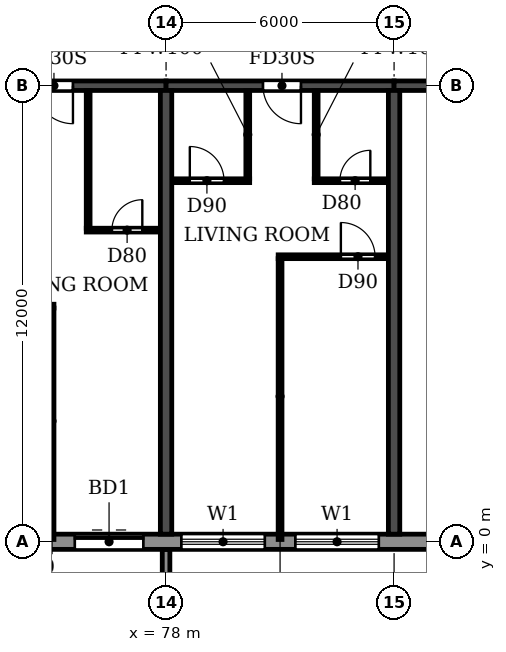
"""IFC4 building model, lengths in metres.
Left out: names, types, materials, properties, quantities, classifications, styles, units other than length and angle.
Written with IfcOpenShell. Run it as: python <this file> out.ifc"""

import sys

from ifc_helpers import new_model, si_unit, direction, frame, frame_2d, origin, place, context, subcontext, project, spatial, polyline, rectangle, outline, extrude, source, transform, mapped, element, fill, save


model = new_model("IFC4")
c1 = context("Model", 3, precision=1e-05, world=origin(), true_north=direction((0.0, 1.0)))
c2 = subcontext(c1, "Body", "Model", "MODEL_VIEW")
j1 = project(units=[si_unit("LENGTHUNIT", "METRE"), si_unit("PLANEANGLEUNIT", "RADIAN")], contexts=[c1])
p1 = place(None, origin())
s1 = spatial("IfcSite", under=j1, at=p1, CompositionType="ELEMENT")
p2 = place(p1, origin())
s2 = spatial("IfcBuilding", under=s1, at=p2, CompositionType="ELEMENT")
p3 = place(p2, frame((0.0, 0.0, 122.4)))
s3 = spatial("IfcBuildingStorey", under=s2, at=p3, CompositionType="ELEMENT", Elevation=122.4)
for number, where, z_axis, x_axis in (
    (1, (78.0, 0.2, 0.0), (0.0, 0.0, 1.0), (0.0, 1.0, 0.0)),
    (2, (84.0, 0.2, 0.0), (0.0, 0.0, 1.0), (0.0, 1.0, 0.0)),
):
    element("IfcWall", number, at=place(p3, frame(where, z_axis=z_axis, x_axis=x_axis)), inside=s3, PredefinedType="SHEAR", context=c2, shape_type="SweptSolid", body=[
        extrude(rectangle(XDim=11.675, YDim=0.3, at=frame_2d((5.837, 0.0))), origin(), (0.0, 0.0, 1.0), 3.07),
    ])
p4 = place(p3, frame((72.0, 12.0, 0.0), z_axis=(0.0, 0.0, 1.0), x_axis=(1.0, 0.0, 0.0)))
e3 = element("IfcWall", 3, at=p4, inside=s3, PredefinedType="SHEAR", context=c2, shape_type="SweptSolid", body=[
    extrude(rectangle(XDim=6.0, YDim=0.25, at=frame_2d((3.0, 0.0))), origin(), (0.0, 0.0, 1.0), 2.47),
])
p5 = place(p4, frame((2.55, 0.0, 0.0)))
e4 = element("IfcOpeningElement", 4, at=p5, cuts=e3, PredefinedType="OPENING", context=c2, shape_type="SweptSolid", body=[
    extrude(rectangle(XDim=1.0, YDim=2.1, at=frame_2d((0.5, 1.05))), frame((0.0, 0.135, 0.0), z_axis=(0.0, -1.0, 0.0), x_axis=(1.0, 0.0, 0.0)), (0.0, 0.0, 1.0), 0.27),
])
p6 = place(p3, frame((78.0, 12.0, 0.0), z_axis=(0.0, 0.0, 1.0), x_axis=(1.0, 0.0, 0.0)))
e5 = element("IfcWall", 5, at=p6, inside=s3, PredefinedType="SHEAR", context=c2, shape_type="SweptSolid", body=[
    extrude(rectangle(XDim=6.0, YDim=0.25, at=frame_2d((3.0, 0.0))), origin(), (0.0, 0.0, 1.0), 2.47),
])
p7 = place(p6, frame((2.55, 0.0, 0.0)))
e6 = element("IfcOpeningElement", 6, at=p7, cuts=e5, PredefinedType="OPENING", context=c2, shape_type="SweptSolid", body=[
    extrude(rectangle(XDim=1.0, YDim=2.1, at=frame_2d((0.5, 1.05))), frame((0.0, 0.135, 0.0), z_axis=(0.0, -1.0, 0.0), x_axis=(1.0, 0.0, 0.0)), (0.0, 0.0, 1.0), 0.27),
])
p8 = place(p3, frame((84.0, 12.0, 0.0), z_axis=(0.0, 0.0, 1.0), x_axis=(1.0, 0.0, 0.0)))
e7 = element("IfcWall", 7, at=p8, inside=s3, PredefinedType="SHEAR", context=c2, shape_type="SweptSolid", body=[
    extrude(rectangle(XDim=5.8, YDim=0.25, at=frame_2d((2.9, 0.0))), origin(), (0.0, 0.0, 1.0), 2.47),
])
p9 = place(p8, frame((2.5, 0.0, 0.0)))
e8 = element("IfcOpeningElement", 8, at=p9, cuts=e7, PredefinedType="OPENING", context=c2, shape_type="SweptSolid", body=[
    extrude(rectangle(XDim=1.0, YDim=2.1, at=frame_2d((0.5, 1.05))), frame((0.0, 0.135, 0.0), z_axis=(0.0, -1.0, 0.0), x_axis=(1.0, 0.0, 0.0)), (0.0, 0.0, 1.0), 0.27),
])
p10 = place(p3, frame((16.683, 0.0, 0.0), z_axis=(0.0, 0.0, 1.0), x_axis=(1.0, 0.0, 0.0)))
e9 = element("IfcWall", 9, at=p10, inside=s3, PredefinedType="STANDARD", context=c2, shape_type="SweptSolid", body=[
    extrude(rectangle(XDim=68.634, YDim=0.4, at=frame_2d((34.317, 0.0))), origin(), (0.0, 0.0, 1.0), 3.07),
])
p11 = place(p10, frame((1.717, 0.0, 0.9)))
e10 = element("IfcOpeningElement", 10, at=p11, cuts=e9, PredefinedType="OPENING", context=c2, shape_type="SweptSolid", body=[
    extrude(rectangle(XDim=2.2, YDim=1.5, at=frame_2d((1.1, 0.75))), frame((0.0, 0.21, 0.0), z_axis=(0.0, -1.0, 0.0), x_axis=(1.0, 0.0, 0.0)), (0.0, 0.0, 1.0), 0.42),
])
p12 = place(p10, frame((4.717, 0.0, 0.9)))
e11 = element("IfcOpeningElement", 11, at=p12, cuts=e9, PredefinedType="OPENING", context=c2, shape_type="SweptSolid", body=[
    extrude(rectangle(XDim=2.2, YDim=1.5, at=frame_2d((1.1, 0.75))), frame((0.0, 0.21, 0.0), z_axis=(0.0, -1.0, 0.0), x_axis=(1.0, 0.0, 0.0)), (0.0, 0.0, 1.0), 0.42),
])
p13 = place(p10, frame((7.717, 0.0, 0.9)))
e12 = element("IfcOpeningElement", 12, at=p13, cuts=e9, PredefinedType="OPENING", context=c2, shape_type="SweptSolid", body=[
    extrude(rectangle(XDim=2.2, YDim=1.5, at=frame_2d((1.1, 0.75))), frame((0.0, 0.21, 0.0), z_axis=(0.0, -1.0, 0.0), x_axis=(1.0, 0.0, 0.0)), (0.0, 0.0, 1.0), 0.42),
])
p14 = place(p10, frame((10.717, 0.0, 0.9)))
e13 = element("IfcOpeningElement", 13, at=p14, cuts=e9, PredefinedType="OPENING", context=c2, shape_type="SweptSolid", body=[
    extrude(rectangle(XDim=2.2, YDim=1.5, at=frame_2d((1.1, 0.75))), frame((0.0, 0.21, 0.0), z_axis=(0.0, -1.0, 0.0), x_axis=(1.0, 0.0, 0.0)), (0.0, 0.0, 1.0), 0.42),
])
p15 = place(p10, frame((13.717, 0.0, 0.9)))
e14 = element("IfcOpeningElement", 14, at=p15, cuts=e9, PredefinedType="OPENING", context=c2, shape_type="SweptSolid", body=[
    extrude(rectangle(XDim=2.2, YDim=1.5, at=frame_2d((1.1, 0.75))), frame((0.0, 0.21, 0.0), z_axis=(0.0, -1.0, 0.0), x_axis=(1.0, 0.0, 0.0)), (0.0, 0.0, 1.0), 0.42),
])
p16 = place(p10, frame((16.717, 0.0, 0.9)))
e15 = element("IfcOpeningElement", 15, at=p16, cuts=e9, PredefinedType="OPENING", context=c2, shape_type="SweptSolid", body=[
    extrude(rectangle(XDim=2.2, YDim=1.5, at=frame_2d((1.1, 0.75))), frame((0.0, 0.21, 0.0), z_axis=(0.0, -1.0, 0.0), x_axis=(1.0, 0.0, 0.0)), (0.0, 0.0, 1.0), 0.42),
])
p17 = place(p10, frame((19.717, 0.0, 0.9)))
e16 = element("IfcOpeningElement", 16, at=p17, cuts=e9, PredefinedType="OPENING", context=c2, shape_type="SweptSolid", body=[
    extrude(rectangle(XDim=2.2, YDim=1.5, at=frame_2d((1.1, 0.75))), frame((0.0, 0.21, 0.0), z_axis=(0.0, -1.0, 0.0), x_axis=(1.0, 0.0, 0.0)), (0.0, 0.0, 1.0), 0.42),
])
p18 = place(p10, frame((22.917, 0.0, 0.0)))
e17 = element("IfcOpeningElement", 17, at=p18, cuts=e9, PredefinedType="OPENING", context=c2, shape_type="SweptSolid", body=[
    extrude(rectangle(XDim=1.8, YDim=2.4, at=frame_2d((0.9, 1.2))), frame((0.0, 0.21, 0.0), z_axis=(0.0, -1.0, 0.0), x_axis=(1.0, 0.0, 0.0)), (0.0, 0.0, 1.0), 0.42),
])
p19 = place(p10, frame((25.717, 0.0, 0.9)))
e18 = element("IfcOpeningElement", 18, at=p19, cuts=e9, PredefinedType="OPENING", context=c2, shape_type="SweptSolid", body=[
    extrude(rectangle(XDim=2.2, YDim=1.5, at=frame_2d((1.1, 0.75))), frame((0.0, 0.21, 0.0), z_axis=(0.0, -1.0, 0.0), x_axis=(1.0, 0.0, 0.0)), (0.0, 0.0, 1.0), 0.42),
])
p20 = place(p10, frame((28.717, 0.0, 0.9)))
e19 = element("IfcOpeningElement", 19, at=p20, cuts=e9, PredefinedType="OPENING", context=c2, shape_type="SweptSolid", body=[
    extrude(rectangle(XDim=2.2, YDim=1.5, at=frame_2d((1.1, 0.75))), frame((0.0, 0.21, 0.0), z_axis=(0.0, -1.0, 0.0), x_axis=(1.0, 0.0, 0.0)), (0.0, 0.0, 1.0), 0.42),
])
p21 = place(p10, frame((31.717, 0.0, 0.9)))
e20 = element("IfcOpeningElement", 20, at=p21, cuts=e9, PredefinedType="OPENING", context=c2, shape_type="SweptSolid", body=[
    extrude(rectangle(XDim=2.2, YDim=1.5, at=frame_2d((1.1, 0.75))), frame((0.0, 0.21, 0.0), z_axis=(0.0, -1.0, 0.0), x_axis=(1.0, 0.0, 0.0)), (0.0, 0.0, 1.0), 0.42),
])
p22 = place(p10, frame((34.917, 0.0, 0.0)))
e21 = element("IfcOpeningElement", 21, at=p22, cuts=e9, PredefinedType="OPENING", context=c2, shape_type="SweptSolid", body=[
    extrude(rectangle(XDim=1.8, YDim=2.4, at=frame_2d((0.9, 1.2))), frame((0.0, 0.21, 0.0), z_axis=(0.0, -1.0, 0.0), x_axis=(1.0, 0.0, 0.0)), (0.0, 0.0, 1.0), 0.42),
])
p23 = place(p10, frame((37.717, 0.0, 0.9)))
e22 = element("IfcOpeningElement", 22, at=p23, cuts=e9, PredefinedType="OPENING", context=c2, shape_type="SweptSolid", body=[
    extrude(rectangle(XDim=2.2, YDim=1.5, at=frame_2d((1.1, 0.75))), frame((0.0, 0.21, 0.0), z_axis=(0.0, -1.0, 0.0), x_axis=(1.0, 0.0, 0.0)), (0.0, 0.0, 1.0), 0.42),
])
p24 = place(p10, frame((40.717, 0.0, 0.9)))
e23 = element("IfcOpeningElement", 23, at=p24, cuts=e9, PredefinedType="OPENING", context=c2, shape_type="SweptSolid", body=[
    extrude(rectangle(XDim=2.2, YDim=1.5, at=frame_2d((1.1, 0.75))), frame((0.0, 0.21, 0.0), z_axis=(0.0, -1.0, 0.0), x_axis=(1.0, 0.0, 0.0)), (0.0, 0.0, 1.0), 0.42),
])
p25 = place(p10, frame((43.717, 0.0, 0.9)))
e24 = element("IfcOpeningElement", 24, at=p25, cuts=e9, PredefinedType="OPENING", context=c2, shape_type="SweptSolid", body=[
    extrude(rectangle(XDim=2.2, YDim=1.5, at=frame_2d((1.1, 0.75))), frame((0.0, 0.21, 0.0), z_axis=(0.0, -1.0, 0.0), x_axis=(1.0, 0.0, 0.0)), (0.0, 0.0, 1.0), 0.42),
])
p26 = place(p10, frame((46.917, 0.0, 0.0)))
e25 = element("IfcOpeningElement", 25, at=p26, cuts=e9, PredefinedType="OPENING", context=c2, shape_type="SweptSolid", body=[
    extrude(rectangle(XDim=1.8, YDim=2.4, at=frame_2d((0.9, 1.2))), frame((0.0, 0.21, 0.0), z_axis=(0.0, -1.0, 0.0), x_axis=(1.0, 0.0, 0.0)), (0.0, 0.0, 1.0), 0.42),
])
p27 = place(p10, frame((49.717, 0.0, 0.9)))
e26 = element("IfcOpeningElement", 26, at=p27, cuts=e9, PredefinedType="OPENING", context=c2, shape_type="SweptSolid", body=[
    extrude(rectangle(XDim=2.2, YDim=1.5, at=frame_2d((1.1, 0.75))), frame((0.0, 0.21, 0.0), z_axis=(0.0, -1.0, 0.0), x_axis=(1.0, 0.0, 0.0)), (0.0, 0.0, 1.0), 0.42),
])
p28 = place(p10, frame((52.717, 0.0, 0.9)))
e27 = element("IfcOpeningElement", 27, at=p28, cuts=e9, PredefinedType="OPENING", context=c2, shape_type="SweptSolid", body=[
    extrude(rectangle(XDim=2.2, YDim=1.5, at=frame_2d((1.1, 0.75))), frame((0.0, 0.21, 0.0), z_axis=(0.0, -1.0, 0.0), x_axis=(1.0, 0.0, 0.0)), (0.0, 0.0, 1.0), 0.42),
])
p29 = place(p10, frame((55.717, 0.0, 0.9)))
e28 = element("IfcOpeningElement", 28, at=p29, cuts=e9, PredefinedType="OPENING", context=c2, shape_type="SweptSolid", body=[
    extrude(rectangle(XDim=2.2, YDim=1.5, at=frame_2d((1.1, 0.75))), frame((0.0, 0.21, 0.0), z_axis=(0.0, -1.0, 0.0), x_axis=(1.0, 0.0, 0.0)), (0.0, 0.0, 1.0), 0.42),
])
p30 = place(p10, frame((58.917, 0.0, 0.0)))
e29 = element("IfcOpeningElement", 29, at=p30, cuts=e9, PredefinedType="OPENING", context=c2, shape_type="SweptSolid", body=[
    extrude(rectangle(XDim=1.8, YDim=2.4, at=frame_2d((0.9, 1.2))), frame((0.0, 0.21, 0.0), z_axis=(0.0, -1.0, 0.0), x_axis=(1.0, 0.0, 0.0)), (0.0, 0.0, 1.0), 0.42),
])
p31 = place(p10, frame((61.717, 0.0, 0.9)))
e30 = element("IfcOpeningElement", 30, at=p31, cuts=e9, PredefinedType="OPENING", context=c2, shape_type="SweptSolid", body=[
    extrude(rectangle(XDim=2.2, YDim=1.5, at=frame_2d((1.1, 0.75))), frame((0.0, 0.21, 0.0), z_axis=(0.0, -1.0, 0.0), x_axis=(1.0, 0.0, 0.0)), (0.0, 0.0, 1.0), 0.42),
])
p32 = place(p10, frame((64.717, 0.0, 0.9)))
e31 = element("IfcOpeningElement", 31, at=p32, cuts=e9, PredefinedType="OPENING", context=c2, shape_type="SweptSolid", body=[
    extrude(rectangle(XDim=2.2, YDim=1.5, at=frame_2d((1.1, 0.75))), frame((0.0, 0.21, 0.0), z_axis=(0.0, -1.0, 0.0), x_axis=(1.0, 0.0, 0.0)), (0.0, 0.0, 1.0), 0.42),
])
m1 = source(origin(), c2, "Body", "SweptSolid", [
    extrude(outline(polyline([(0.0, 0.0), (0.2, 0.0), (0.2, 1.65), (0.0, 1.65), (0.0, 0.0)])), origin(), (0.0, 0.0, 1.0), 3.1),
])
p33 = place(p3, frame((77.9, -1.85, 0.0)))
e32 = element("IfcWall", 32, at=p33, inside=s3, PredefinedType="STANDARD", context=c2, shape_type="MappedRepresentation", body=[
    mapped(m1, transform((0.0, 0.0, 0.0))),
])
p34 = place(p3, frame((72.16, 6.2, 0.0), z_axis=(0.0, 0.0, 1.0), x_axis=(1.0, 0.0, 0.0)))
e33 = element("IfcWall", 33, at=p34, inside=s3, PredefinedType="PARTITIONING", context=c2, shape_type="SweptSolid", body=[
    extrude(rectangle(XDim=2.89, YDim=0.1, at=frame_2d((1.445, 0.0))), origin(), (0.0, 0.0, 1.0), 3.07),
])
p35 = place(p34, frame((0.34, 0.0, 0.0)))
e34 = element("IfcOpeningElement", 34, at=p35, cuts=e33, PredefinedType="OPENING", context=c2, shape_type="SweptSolid", body=[
    extrude(rectangle(XDim=0.9, YDim=2.1, at=frame_2d((0.45, 1.05))), frame((0.0, 0.06, 0.0), z_axis=(0.0, -1.0, 0.0), x_axis=(1.0, 0.0, 0.0)), (0.0, 0.0, 1.0), 0.12),
])
p36 = place(p3, frame((80.95, 7.5, 0.0), z_axis=(0.0, 0.0, 1.0), x_axis=(1.0, 0.0, 0.0)))
e35 = element("IfcWall", 35, at=p36, inside=s3, PredefinedType="PARTITIONING", context=c2, shape_type="SweptSolid", body=[
    extrude(rectangle(XDim=2.89, YDim=0.1, at=frame_2d((1.445, 0.0))), origin(), (0.0, 0.0, 1.0), 3.07),
])
p37 = place(p36, frame((1.65, 0.0, 0.0)))
e36 = element("IfcOpeningElement", 36, at=p37, cuts=e35, PredefinedType="OPENING", context=c2, shape_type="SweptSolid", body=[
    extrude(rectangle(XDim=0.9, YDim=2.1, at=frame_2d((0.45, 1.05))), frame((0.0, 0.06, 0.0), z_axis=(0.0, -1.0, 0.0), x_axis=(1.0, 0.0, 0.0)), (0.0, 0.0, 1.0), 0.12),
])
p38 = place(p3, frame((75.9, 8.2, 0.0), z_axis=(0.0, 0.0, 1.0), x_axis=(1.0, 0.0, 0.0)))
e37 = element("IfcWall", 37, at=p38, inside=s3, PredefinedType="PARTITIONING", context=c2, shape_type="SweptSolid", body=[
    extrude(rectangle(XDim=1.94, YDim=0.1, at=frame_2d((0.97, 0.0))), origin(), (0.0, 0.0, 1.0), 3.07),
])
p39 = place(p38, frame((0.675, 0.0, 0.0)))
e38 = element("IfcOpeningElement", 38, at=p39, cuts=e37, PredefinedType="OPENING", context=c2, shape_type="SweptSolid", body=[
    extrude(rectangle(XDim=0.8, YDim=2.1, at=frame_2d((0.4, 1.05))), frame((0.0, 0.06, 0.0), z_axis=(0.0, -1.0, 0.0), x_axis=(1.0, 0.0, 0.0)), (0.0, 0.0, 1.0), 0.12),
])
p40 = place(p3, frame((78.16, 9.5, 0.0), z_axis=(0.0, 0.0, 1.0), x_axis=(1.0, 0.0, 0.0)))
e39 = element("IfcWall", 39, at=p40, inside=s3, PredefinedType="PARTITIONING", context=c2, shape_type="SweptSolid", body=[
    extrude(rectangle(XDim=2.04, YDim=0.1, at=frame_2d((1.02, 0.0))), origin(), (0.0, 0.0, 1.0), 3.07),
])
p41 = place(p40, frame((0.465, 0.0, 0.0)))
e40 = element("IfcOpeningElement", 40, at=p41, cuts=e39, PredefinedType="OPENING", context=c2, shape_type="SweptSolid", body=[
    extrude(rectangle(XDim=0.9, YDim=2.1, at=frame_2d((0.45, 1.05))), frame((0.0, 0.06, 0.0), z_axis=(0.0, -1.0, 0.0), x_axis=(1.0, 0.0, 0.0)), (0.0, 0.0, 1.0), 0.12),
])
p42 = place(p3, frame((81.9, 9.5, 0.0), z_axis=(0.0, 0.0, 1.0), x_axis=(1.0, 0.0, 0.0)))
e41 = element("IfcWall", 41, at=p42, inside=s3, PredefinedType="PARTITIONING", context=c2, shape_type="SweptSolid", body=[
    extrude(rectangle(XDim=1.94, YDim=0.1, at=frame_2d((0.97, 0.0))), origin(), (0.0, 0.0, 1.0), 3.07),
])
p43 = place(p42, frame((0.675, 0.0, 0.0)))
e42 = element("IfcOpeningElement", 42, at=p43, cuts=e41, PredefinedType="OPENING", context=c2, shape_type="SweptSolid", body=[
    extrude(rectangle(XDim=0.8, YDim=2.1, at=frame_2d((0.4, 1.05))), frame((0.0, 0.06, 0.0), z_axis=(0.0, -1.0, 0.0), x_axis=(1.0, 0.0, 0.0)), (0.0, 0.0, 1.0), 0.12),
])
p44 = place(p3, frame((75.0, 0.06, 0.0), z_axis=(0.0, 0.0, 1.0), x_axis=(0.0, 1.0, 0.0)))
e43 = element("IfcWall", 43, at=p44, inside=s3, PredefinedType="PARTITIONING", context=c2, shape_type="SweptSolid", body=[
    extrude(rectangle(XDim=6.09, YDim=0.1, at=frame_2d((3.045, 0.0))), origin(), (0.0, 0.0, 1.0), 3.07),
])
p45 = place(p3, frame((75.95, 8.25, 0.0), z_axis=(0.0, 0.0, 1.0), x_axis=(0.0, 1.0, 0.0)))
e44 = element("IfcWall", 44, at=p45, inside=s3, PredefinedType="PARTITIONING", context=c2, shape_type="SweptSolid", body=[
    extrude(rectangle(XDim=3.615, YDim=0.1, at=frame_2d((1.808, 0.0))), origin(), (0.0, 0.0, 1.0), 3.07),
])
p46 = place(p3, frame((80.15, 9.55, 0.0), z_axis=(0.0, 0.0, 1.0), x_axis=(0.0, 1.0, 0.0)))
e45 = element("IfcWall", 45, at=p46, inside=s3, PredefinedType="PARTITIONING", context=c2, shape_type="SweptSolid", body=[
    extrude(rectangle(XDim=2.315, YDim=0.1, at=frame_2d((1.157, 0.0))), origin(), (0.0, 0.0, 1.0), 3.07),
])
p47 = place(p3, frame((81.0, 0.06, 0.0), z_axis=(0.0, 0.0, 1.0), x_axis=(0.0, 1.0, 0.0)))
e46 = element("IfcWall", 46, at=p47, inside=s3, PredefinedType="PARTITIONING", context=c2, shape_type="SweptSolid", body=[
    extrude(rectangle(XDim=7.39, YDim=0.1, at=frame_2d((3.695, 0.0))), origin(), (0.0, 0.0, 1.0), 3.07),
])
p48 = place(p3, frame((81.95, 9.55, 0.0), z_axis=(0.0, 0.0, 1.0), x_axis=(0.0, 1.0, 0.0)))
e47 = element("IfcWall", 47, at=p48, inside=s3, PredefinedType="PARTITIONING", context=c2, shape_type="SweptSolid", body=[
    extrude(rectangle(XDim=2.315, YDim=0.1, at=frame_2d((1.157, 0.0))), origin(), (0.0, 0.0, 1.0), 3.07),
])
p49 = place(p30, origin())
e48 = element("IfcDoor", 48, at=p49, inside=s3, OperationType="DOUBLE_DOOR_SLIDING", PredefinedType="DOOR", context=c2, shape_type="SweptSolid", body=[
    extrude(rectangle(XDim=1.8, YDim=2.4, at=frame_2d((0.9, 1.2))), frame((0.0, 0.025, 0.0), z_axis=(0.0, -1.0, 0.0), x_axis=(1.0, 0.0, 0.0)), (0.0, 0.0, 1.0), 0.05),
])
fill(e29, e48)
p50 = place(p31, origin())
e49 = element("IfcWindow", 49, at=p50, inside=s3, PartitioningType="DOUBLE_PANEL_HORIZONTAL", PredefinedType="WINDOW", context=c2, shape_type="SweptSolid", body=[
    extrude(rectangle(XDim=2.2, YDim=1.5, at=frame_2d((1.1, 0.75))), frame((0.0, 0.03, 0.0), z_axis=(0.0, -1.0, 0.0), x_axis=(1.0, 0.0, 0.0)), (0.0, 0.0, 1.0), 0.06),
])
fill(e30, e49)
p51 = place(p32, origin())
e50 = element("IfcWindow", 50, at=p51, inside=s3, PartitioningType="DOUBLE_PANEL_HORIZONTAL", PredefinedType="WINDOW", context=c2, shape_type="SweptSolid", body=[
    extrude(rectangle(XDim=2.2, YDim=1.5, at=frame_2d((1.1, 0.75))), frame((0.0, 0.03, 0.0), z_axis=(0.0, -1.0, 0.0), x_axis=(1.0, 0.0, 0.0)), (0.0, 0.0, 1.0), 0.06),
])
fill(e31, e50)
p52 = place(p5, frame((1.0, 0.0, 0.0), z_axis=(0.0, 0.0, 1.0), x_axis=(-1.0, 0.0, 0.0)))
e51 = element("IfcDoor", 51, at=p52, inside=s3, OperationType="SINGLE_SWING_LEFT", PredefinedType="DOOR", context=c2, shape_type="SweptSolid", body=[
    extrude(rectangle(XDim=1.0, YDim=2.1, at=frame_2d((0.5, 1.05))), frame((0.0, 0.025, 0.0), z_axis=(0.0, -1.0, 0.0), x_axis=(1.0, 0.0, 0.0)), (0.0, 0.0, 1.0), 0.05),
])
fill(e4, e51)
p53 = place(p39, origin())
e52 = element("IfcDoor", 52, at=p53, inside=s3, OperationType="SINGLE_SWING_RIGHT", PredefinedType="DOOR", context=c2, shape_type="SweptSolid", body=[
    extrude(rectangle(XDim=0.8, YDim=2.1, at=frame_2d((0.4, 1.05))), frame((0.0, 0.025, 0.0), z_axis=(0.0, -1.0, 0.0), x_axis=(1.0, 0.0, 0.0)), (0.0, 0.0, 1.0), 0.05),
])
fill(e38, e52)
p54 = place(p41, origin())
e53 = element("IfcDoor", 53, at=p54, inside=s3, OperationType="SINGLE_SWING_LEFT", PredefinedType="DOOR", context=c2, shape_type="SweptSolid", body=[
    extrude(rectangle(XDim=0.9, YDim=2.1, at=frame_2d((0.45, 1.05))), frame((0.0, 0.025, 0.0), z_axis=(0.0, -1.0, 0.0), x_axis=(1.0, 0.0, 0.0)), (0.0, 0.0, 1.0), 0.05),
])
fill(e40, e53)
p55 = place(p7, frame((1.0, 0.0, 0.0), z_axis=(0.0, 0.0, 1.0), x_axis=(-1.0, 0.0, 0.0)))
e54 = element("IfcDoor", 54, at=p55, inside=s3, OperationType="SINGLE_SWING_LEFT", PredefinedType="DOOR", context=c2, shape_type="SweptSolid", body=[
    extrude(rectangle(XDim=1.0, YDim=2.1, at=frame_2d((0.5, 1.05))), frame((0.0, 0.025, 0.0), z_axis=(0.0, -1.0, 0.0), x_axis=(1.0, 0.0, 0.0)), (0.0, 0.0, 1.0), 0.05),
])
fill(e6, e54)
p56 = place(p43, origin())
e55 = element("IfcDoor", 55, at=p56, inside=s3, OperationType="SINGLE_SWING_RIGHT", PredefinedType="DOOR", context=c2, shape_type="SweptSolid", body=[
    extrude(rectangle(XDim=0.8, YDim=2.1, at=frame_2d((0.4, 1.05))), frame((0.0, 0.025, 0.0), z_axis=(0.0, -1.0, 0.0), x_axis=(1.0, 0.0, 0.0)), (0.0, 0.0, 1.0), 0.05),
])
fill(e42, e55)
p57 = place(p37, origin())
e56 = element("IfcDoor", 56, at=p57, inside=s3, OperationType="SINGLE_SWING_LEFT", PredefinedType="DOOR", context=c2, shape_type="SweptSolid", body=[
    extrude(rectangle(XDim=0.9, YDim=2.1, at=frame_2d((0.45, 1.05))), frame((0.0, 0.025, 0.0), z_axis=(0.0, -1.0, 0.0), x_axis=(1.0, 0.0, 0.0)), (0.0, 0.0, 1.0), 0.05),
])
fill(e36, e56)
save(model, sys.argv[1])
